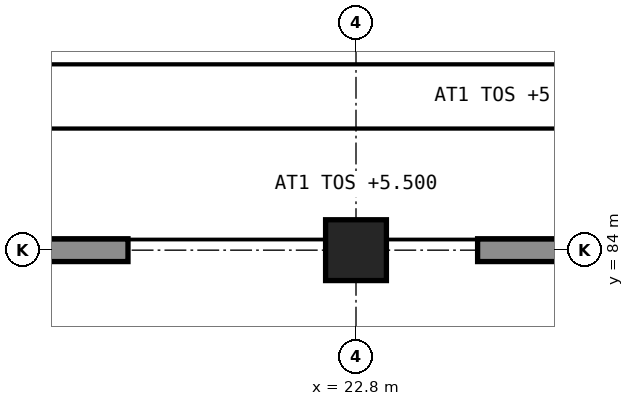
"""IFC4 building model, lengths in metres.
Left out: names, types, materials, properties, quantities, classifications, styles, units other than length and angle.
Written with IfcOpenShell. Run it as: python <this file> out.ifc"""

import sys

from ifc_helpers import new_model, si_unit, direction, frame, frame_2d, origin, origin_2d, place, context, subcontext, project, spatial, rectangle, extrude, element, save


model = new_model("IFC4")
c1 = context("Model", 3, precision=1e-05, world=origin(), true_north=direction((0.0, 1.0)))
c2 = subcontext(c1, "Body", "Model", "MODEL_VIEW")
j1 = project(units=[si_unit("LENGTHUNIT", "METRE"), si_unit("PLANEANGLEUNIT", "RADIAN")], contexts=[c1])
p1 = place(None, origin())
s1 = spatial("IfcSite", under=j1, at=p1, CompositionType="ELEMENT")
p2 = place(p1, origin())
s2 = spatial("IfcBuilding", under=s1, at=p2, CompositionType="ELEMENT")
p3 = place(p2, origin())
s3 = spatial("IfcBuildingStorey", under=s2, at=p3, CompositionType="ELEMENT", Elevation=0.0)
p4 = place(p3, frame((22.8, 84.0, -0.3), z_axis=(0.0, 0.0, 1.0), x_axis=(1.0, 0.0, 0.0)))
e1 = element("IfcColumn", 1, at=p4, inside=s3, PredefinedType="COLUMN", context=c2, shape_type="SweptSolid", body=[
    extrude(rectangle(XDim=0.8, YDim=0.8, at=origin_2d()), origin(), (0.0, 0.0, 1.0), 5.8),
])
p5 = place(p3, frame((24.4, 84.0, 0.0), z_axis=(0.0, 0.0, 1.0), x_axis=(1.0, 0.0, 0.0)))
e2 = element("IfcWall", 2, at=p5, inside=s3, PredefinedType="PARTITIONING", context=c2, shape_type="SweptSolid", body=[
    extrude(rectangle(XDim=6.8, YDim=0.3, at=frame_2d((3.4, 0.0))), origin(), (0.0, 0.0, 1.0), 4.4),
])
p6 = place(p5, frame((3.675, 0.0, 0.0)))
e3 = element("IfcOpeningElement", 3, at=p6, cuts=e2, PredefinedType="OPENING", context=c2, shape_type="SweptSolid", body=[
    extrude(rectangle(XDim=1.8, YDim=2.1, at=frame_2d((0.9, 1.05))), frame((0.0, 0.16, 0.0), z_axis=(0.0, -1.0, 0.0), x_axis=(1.0, 0.0, 0.0)), (0.0, 0.0, 1.0), 0.32),
])
p7 = place(p3, frame((14.4, 84.0, 0.0), z_axis=(0.0, 0.0, 1.0), x_axis=(1.0, 0.0, 0.0)))
e4 = element("IfcWall", 4, at=p7, inside=s3, PredefinedType="PARTITIONING", context=c2, shape_type="SweptSolid", body=[
    extrude(rectangle(XDim=5.4, YDim=0.3, at=frame_2d((2.7, 0.0))), origin(), (0.0, 0.0, 1.0), 4.4),
])
p8 = place(p7, frame((1.325, 0.0, 0.0)))
e5 = element("IfcOpeningElement", 5, at=p8, cuts=e4, PredefinedType="OPENING", context=c2, shape_type="SweptSolid", body=[
    extrude(rectangle(XDim=1.8, YDim=2.1, at=frame_2d((0.9, 1.05))), frame((0.0, 0.16, 0.0), z_axis=(0.0, -1.0, 0.0), x_axis=(1.0, 0.0, 0.0)), (0.0, 0.0, 1.0), 0.32),
])
save(model, sys.argv[1])
